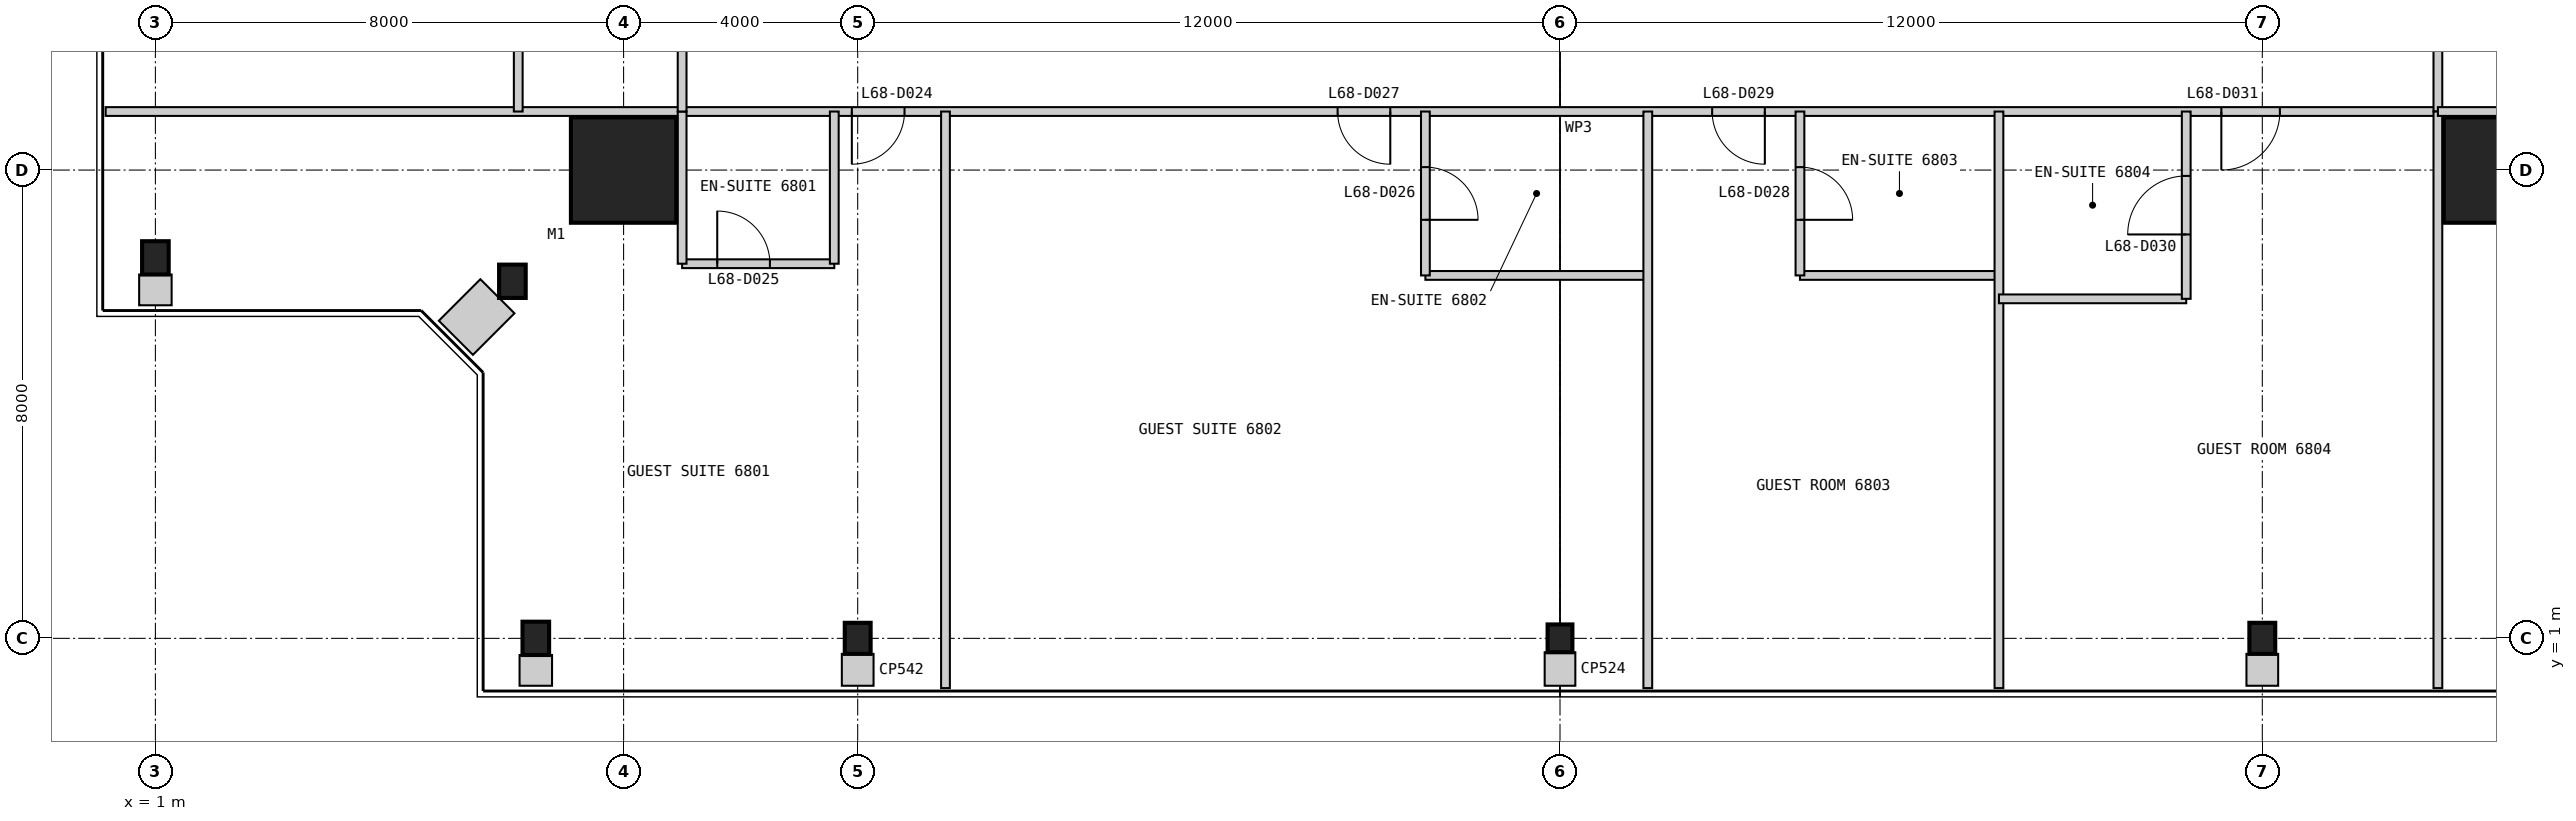
"""IFC4 building model, lengths in metres.
Left out: names, types, materials, properties, quantities, classifications, styles, units other than length and angle.
Written with IfcOpenShell. Run it as: python <this file> out.ifc"""

import sys

from ifc_helpers import new_model, si_unit, direction, frame, frame_2d, origin, origin_2d, place, context, subcontext, project, spatial, rectangle, i_section, extrude, element, fill, save


model = new_model("IFC4")
c1 = context("Model", 3, precision=1e-05, world=origin(), true_north=direction((0.0, 1.0)))
c2 = subcontext(c1, "Body", "Model", "MODEL_VIEW")
j1 = project(units=[si_unit("LENGTHUNIT", "METRE"), si_unit("PLANEANGLEUNIT", "RADIAN")], contexts=[c1])
p1 = place(None, origin())
s1 = spatial("IfcSite", under=j1, at=p1, CompositionType="ELEMENT")
p2 = place(p1, origin())
s2 = spatial("IfcBuilding", under=s1, at=p2, CompositionType="ELEMENT")
p3 = place(p2, frame((0.0, 0.0, 283.2)))
s3 = spatial("IfcBuildingStorey", under=s2, at=p3, CompositionType="ELEMENT", Elevation=283.2)
for number, where, z_axis, x_axis in (
    (1, (9.0, 9.0, 0.0), (0.0, 0.0, 1.0), (1.0, 0.0, 0.0)),
    (2, (41.0, 9.0, 0.0), (0.0, 0.0, 1.0), (1.0, 0.0, 0.0)),
):
    element("IfcColumn", number, at=place(p3, frame(where, z_axis=z_axis, x_axis=x_axis)), inside=s3, PredefinedType="COLUMN", context=c2, shape_type="SweptSolid", body=[
        extrude(rectangle(XDim=1.8, YDim=1.8, at=origin_2d()), origin(), (0.0, 0.0, 1.0), 3.4),
    ])
p4 = place(p3, frame((7.5, 1.0, 0.0), z_axis=(0.0, 0.0, 1.0), x_axis=(1.0, 0.0, 0.0)))
e3 = element("IfcColumn", 3, at=p4, inside=s3, PredefinedType="COLUMN", context=c2, shape_type="SweptSolid", body=[
    extrude(i_section(OverallWidth=0.455, OverallDepth=0.569, WebThickness=0.078, FlangeThickness=0.125, at=origin_2d()), origin(), (0.0, 0.0, 1.0), 3.4),
])
p5 = place(p3, frame((13.0, 1.0, 0.0), z_axis=(0.0, 0.0, 1.0), x_axis=(1.0, 0.0, 0.0)))
e4 = element("IfcColumn", 4, at=p5, inside=s3, PredefinedType="COLUMN", context=c2, shape_type="SweptSolid", body=[
    extrude(i_section(OverallWidth=0.442, OverallDepth=0.531, WebThickness=0.066, FlangeThickness=0.106, at=origin_2d()), origin(), (0.0, 0.0, 1.0), 3.4),
])
p6 = place(p3, frame((25.0, 1.0, 0.0), z_axis=(0.0, 0.0, 1.0), x_axis=(1.0, 0.0, 0.0)))
e5 = element("IfcColumn", 5, at=p6, inside=s3, PredefinedType="COLUMN", context=c2, shape_type="SweptSolid", body=[
    extrude(i_section(OverallWidth=0.424, OverallDepth=0.475, WebThickness=0.048, FlangeThickness=0.077, at=origin_2d()), origin(), (0.0, 0.0, 1.0), 3.4),
])
p7 = place(p3, frame((37.0, 1.0, 0.0), z_axis=(0.0, 0.0, 1.0), x_axis=(1.0, 0.0, 0.0)))
e6 = element("IfcColumn", 6, at=p7, inside=s3, PredefinedType="COLUMN", context=c2, shape_type="SweptSolid", body=[
    extrude(i_section(OverallWidth=0.442, OverallDepth=0.531, WebThickness=0.066, FlangeThickness=0.106, at=origin_2d()), origin(), (0.0, 0.0, 1.0), 3.4),
])
for number, where, z_axis, x_axis in (
    (7, (1.0, 7.5, 0.0), (0.0, 0.0, 1.0), (1.0, 0.0, 0.0)),
    (8, (7.1, 7.1, 0.0), (0.0, 0.0, 1.0), (1.0, 0.0, 0.0)),
):
    element("IfcColumn", number, at=place(p3, frame(where, z_axis=z_axis, x_axis=x_axis)), inside=s3, PredefinedType="COLUMN", context=c2, shape_type="SweptSolid", body=[
        extrude(i_section(OverallWidth=0.455, OverallDepth=0.569, WebThickness=0.078, FlangeThickness=0.125, at=origin_2d()), origin(), (0.0, 0.0, 1.0), 3.4),
    ])
p8 = place(p3, frame((10.0, 10.0, 0.0), z_axis=(0.0, 0.0, 1.0), x_axis=(1.0, 0.0, 0.0)))
e9 = element("IfcWall", 9, at=p8, inside=s3, PredefinedType="PARTITIONING", context=c2, shape_type="SweptSolid", body=[
    extrude(rectangle(XDim=30.0, YDim=0.15, at=frame_2d((15.0, 0.0))), origin(), (0.0, 0.0, 1.0), 3.25),
])
p9 = place(p8, frame((2.9, 0.0, 0.0)))
e10 = element("IfcOpeningElement", 10, at=p9, cuts=e9, PredefinedType="OPENING", context=c2, shape_type="SweptSolid", body=[
    extrude(rectangle(XDim=0.9, YDim=2.1, at=frame_2d((0.45, 1.05))), frame((0.0, 0.085, 0.0), z_axis=(0.0, -1.0, 0.0), x_axis=(1.0, 0.0, 0.0)), (0.0, 0.0, 1.0), 0.17),
])
p10 = place(p8, frame((11.2, 0.0, 0.0)))
e11 = element("IfcOpeningElement", 11, at=p10, cuts=e9, PredefinedType="OPENING", context=c2, shape_type="SweptSolid", body=[
    extrude(rectangle(XDim=0.9, YDim=2.1, at=frame_2d((0.45, 1.05))), frame((0.0, 0.085, 0.0), z_axis=(0.0, -1.0, 0.0), x_axis=(1.0, 0.0, 0.0)), (0.0, 0.0, 1.0), 0.17),
])
p11 = place(p8, frame((17.6, 0.0, 0.0)))
e12 = element("IfcOpeningElement", 12, at=p11, cuts=e9, PredefinedType="OPENING", context=c2, shape_type="SweptSolid", body=[
    extrude(rectangle(XDim=0.9, YDim=2.1, at=frame_2d((0.45, 1.05))), frame((0.0, 0.085, 0.0), z_axis=(0.0, -1.0, 0.0), x_axis=(1.0, 0.0, 0.0)), (0.0, 0.0, 1.0), 0.17),
])
p12 = place(p8, frame((26.3, 0.0, 0.0)))
e13 = element("IfcOpeningElement", 13, at=p12, cuts=e9, PredefinedType="OPENING", context=c2, shape_type="SweptSolid", body=[
    extrude(rectangle(XDim=1.0, YDim=2.1, at=frame_2d((0.5, 1.05))), frame((0.0, 0.085, 0.0), z_axis=(0.0, -1.0, 0.0), x_axis=(1.0, 0.0, 0.0)), (0.0, 0.0, 1.0), 0.17),
])
p13 = place(p3, frame((0.15, 10.0, 0.0), z_axis=(0.0, 0.0, 1.0), x_axis=(1.0, 0.0, 0.0)))
e14 = element("IfcWall", 14, at=p13, inside=s3, PredefinedType="PARTITIONING", context=c2, shape_type="SweptSolid", body=[
    extrude(rectangle(XDim=9.85, YDim=0.15, at=frame_2d((4.925, 0.0))), origin(), (0.0, 0.0, 1.0), 3.25),
])
p14 = place(p3, frame((10.0, 7.4, 0.0), z_axis=(0.0, 0.0, 1.0), x_axis=(1.0, 0.0, 0.0)))
e15 = element("IfcWall", 15, at=p14, inside=s3, PredefinedType="PARTITIONING", context=c2, shape_type="SweptSolid", body=[
    extrude(rectangle(XDim=2.6, YDim=0.15, at=frame_2d((1.3, 0.0))), origin(), (0.0, 0.0, 1.0), 3.25),
])
p15 = place(p14, frame((0.6, 0.0, 0.0)))
e16 = element("IfcOpeningElement", 16, at=p15, cuts=e15, PredefinedType="OPENING", context=c2, shape_type="SweptSolid", body=[
    extrude(rectangle(XDim=0.9, YDim=2.1, at=frame_2d((0.45, 1.05))), frame((0.0, 0.085, 0.0), z_axis=(0.0, -1.0, 0.0), x_axis=(1.0, 0.0, 0.0)), (0.0, 0.0, 1.0), 0.17),
])
for number, where, z_axis, x_axis in (
    (17, (10.0, 7.4, 0.0), (0.0, 0.0, 1.0), (0.0, 1.0, 0.0)),
    (18, (12.6, 7.4, 0.0), (0.0, 0.0, 1.0), (0.0, 1.0, 0.0)),
):
    element("IfcWall", number, at=place(p3, frame(where, z_axis=z_axis, x_axis=x_axis)), inside=s3, PredefinedType="PARTITIONING", context=c2, shape_type="SweptSolid", body=[
        extrude(rectangle(XDim=2.6, YDim=0.15, at=frame_2d((1.3, 0.0))), origin(), (0.0, 0.0, 1.0), 3.25),
    ])
p16 = place(p3, frame((14.5, 0.15, 0.0), z_axis=(0.0, 0.0, 1.0), x_axis=(0.0, 1.0, 0.0)))
e19 = element("IfcWall", 19, at=p16, inside=s3, PredefinedType="PARTITIONING", context=c2, shape_type="SweptSolid", body=[
    extrude(rectangle(XDim=9.85, YDim=0.15, at=frame_2d((4.925, 0.0))), origin(), (0.0, 0.0, 1.0), 3.25),
])
p17 = place(p3, frame((22.7, 7.2, 0.0), z_axis=(0.0, 0.0, 1.0), x_axis=(1.0, 0.0, 0.0)))
e20 = element("IfcWall", 20, at=p17, inside=s3, PredefinedType="PARTITIONING", context=c2, shape_type="SweptSolid", body=[
    extrude(rectangle(XDim=3.8, YDim=0.15, at=frame_2d((1.9, 0.0))), origin(), (0.0, 0.0, 1.0), 3.25),
])
p18 = place(p3, frame((22.7, 7.2, 0.0), z_axis=(0.0, 0.0, 1.0), x_axis=(0.0, 1.0, 0.0)))
e21 = element("IfcWall", 21, at=p18, inside=s3, PredefinedType="PARTITIONING", context=c2, shape_type="SweptSolid", body=[
    extrude(rectangle(XDim=2.8, YDim=0.15, at=frame_2d((1.4, 0.0))), origin(), (0.0, 0.0, 1.0), 3.25),
])
p19 = place(p18, frame((0.95, 0.0, 0.0)))
e22 = element("IfcOpeningElement", 22, at=p19, cuts=e21, PredefinedType="OPENING", context=c2, shape_type="SweptSolid", body=[
    extrude(rectangle(XDim=0.9, YDim=2.1, at=frame_2d((0.45, 1.05))), frame((0.0, 0.085, 0.0), z_axis=(0.0, -1.0, 0.0), x_axis=(1.0, 0.0, 0.0)), (0.0, 0.0, 1.0), 0.17),
])
p20 = place(p3, frame((26.5, 0.15, 0.0), z_axis=(0.0, 0.0, 1.0), x_axis=(0.0, 1.0, 0.0)))
e23 = element("IfcWall", 23, at=p20, inside=s3, PredefinedType="PARTITIONING", context=c2, shape_type="SweptSolid", body=[
    extrude(rectangle(XDim=9.85, YDim=0.15, at=frame_2d((4.925, 0.0))), origin(), (0.0, 0.0, 1.0), 3.25),
])
p21 = place(p3, frame((29.1, 7.2, 0.0), z_axis=(0.0, 0.0, 1.0), x_axis=(1.0, 0.0, 0.0)))
e24 = element("IfcWall", 24, at=p21, inside=s3, PredefinedType="PARTITIONING", context=c2, shape_type="SweptSolid", body=[
    extrude(rectangle(XDim=3.4, YDim=0.15, at=frame_2d((1.7, 0.0))), origin(), (0.0, 0.0, 1.0), 3.25),
])
p22 = place(p3, frame((29.1, 7.2, 0.0), z_axis=(0.0, 0.0, 1.0), x_axis=(0.0, 1.0, 0.0)))
e25 = element("IfcWall", 25, at=p22, inside=s3, PredefinedType="PARTITIONING", context=c2, shape_type="SweptSolid", body=[
    extrude(rectangle(XDim=2.8, YDim=0.15, at=frame_2d((1.4, 0.0))), origin(), (0.0, 0.0, 1.0), 3.25),
])
p23 = place(p22, frame((0.95, 0.0, 0.0)))
e26 = element("IfcOpeningElement", 26, at=p23, cuts=e25, PredefinedType="OPENING", context=c2, shape_type="SweptSolid", body=[
    extrude(rectangle(XDim=0.9, YDim=2.1, at=frame_2d((0.45, 1.05))), frame((0.0, 0.085, 0.0), z_axis=(0.0, -1.0, 0.0), x_axis=(1.0, 0.0, 0.0)), (0.0, 0.0, 1.0), 0.17),
])
p24 = place(p3, frame((32.5, 0.15, 0.0), z_axis=(0.0, 0.0, 1.0), x_axis=(0.0, 1.0, 0.0)))
e27 = element("IfcWall", 27, at=p24, inside=s3, PredefinedType="PARTITIONING", context=c2, shape_type="SweptSolid", body=[
    extrude(rectangle(XDim=9.85, YDim=0.15, at=frame_2d((4.925, 0.0))), origin(), (0.0, 0.0, 1.0), 3.25),
])
p25 = place(p3, frame((32.5, 6.8, 0.0), z_axis=(0.0, 0.0, 1.0), x_axis=(1.0, 0.0, 0.0)))
e28 = element("IfcWall", 28, at=p25, inside=s3, PredefinedType="PARTITIONING", context=c2, shape_type="SweptSolid", body=[
    extrude(rectangle(XDim=3.2, YDim=0.15, at=frame_2d((1.6, 0.0))), origin(), (0.0, 0.0, 1.0), 3.25),
])
p26 = place(p3, frame((35.7, 6.8, 0.0), z_axis=(0.0, 0.0, 1.0), x_axis=(0.0, 1.0, 0.0)))
e29 = element("IfcWall", 29, at=p26, inside=s3, PredefinedType="PARTITIONING", context=c2, shape_type="SweptSolid", body=[
    extrude(rectangle(XDim=3.2, YDim=0.15, at=frame_2d((1.6, 0.0))), origin(), (0.0, 0.0, 1.0), 3.25),
])
p27 = place(p26, frame((1.1, 0.0, 0.0)))
e30 = element("IfcOpeningElement", 30, at=p27, cuts=e29, PredefinedType="OPENING", context=c2, shape_type="SweptSolid", body=[
    extrude(rectangle(XDim=1.0, YDim=2.1, at=frame_2d((0.5, 1.05))), frame((0.0, 0.085, 0.0), z_axis=(0.0, -1.0, 0.0), x_axis=(1.0, 0.0, 0.0)), (0.0, 0.0, 1.0), 0.17),
])
p28 = place(p3, frame((40.0, 10.0, 0.0), z_axis=(0.0, 0.0, 1.0), x_axis=(0.0, 1.0, 0.0)))
e31 = element("IfcWall", 31, at=p28, inside=s3, PredefinedType="PARTITIONING", context=c2, shape_type="SweptSolid", body=[
    extrude(rectangle(XDim=30.0, YDim=0.15, at=frame_2d((15.0, 0.0))), origin(), (0.0, 0.0, 1.0), 2.638),
])
p29 = place(p28, frame((2.9, 0.0, 0.0)))
e32 = element("IfcOpeningElement", 32, at=p29, cuts=e31, PredefinedType="OPENING", context=c2, shape_type="SweptSolid", body=[
    extrude(rectangle(XDim=0.9, YDim=2.1, at=frame_2d((0.45, 1.05))), frame((0.0, 0.085, 0.0), z_axis=(0.0, -1.0, 0.0), x_axis=(1.0, 0.0, 0.0)), (0.0, 0.0, 1.0), 0.17),
])
p30 = place(p28, frame((11.2, 0.0, 0.0)))
e33 = element("IfcOpeningElement", 33, at=p30, cuts=e31, PredefinedType="OPENING", context=c2, shape_type="SweptSolid", body=[
    extrude(rectangle(XDim=0.9, YDim=2.1, at=frame_2d((0.45, 1.05))), frame((0.0, 0.085, 0.0), z_axis=(0.0, -1.0, 0.0), x_axis=(1.0, 0.0, 0.0)), (0.0, 0.0, 1.0), 0.17),
])
p31 = place(p28, frame((24.7, 0.0, 0.0)))
e34 = element("IfcOpeningElement", 34, at=p31, cuts=e31, PredefinedType="OPENING", context=c2, shape_type="SweptSolid", body=[
    extrude(rectangle(XDim=0.9, YDim=2.1, at=frame_2d((0.45, 1.05))), frame((0.0, 0.085, 0.0), z_axis=(0.0, -1.0, 0.0), x_axis=(1.0, 0.0, 0.0)), (0.0, 0.0, 1.0), 0.17),
])
p32 = place(p3, frame((40.0, 0.15, 0.0), z_axis=(0.0, 0.0, 1.0), x_axis=(0.0, 1.0, 0.0)))
e35 = element("IfcWall", 35, at=p32, inside=s3, PredefinedType="PARTITIONING", context=c2, shape_type="SweptSolid", body=[
    extrude(rectangle(XDim=9.85, YDim=0.15, at=frame_2d((4.925, 0.0))), origin(), (0.0, 0.0, 1.0), 3.25),
])
p33 = place(p3, frame((42.6, 10.0, 0.0), z_axis=(0.0, 0.0, 1.0), x_axis=(-1.0, 0.0, 0.0)))
e36 = element("IfcWall", 36, at=p33, inside=s3, PredefinedType="PARTITIONING", context=c2, shape_type="SweptSolid", body=[
    extrude(rectangle(XDim=2.6, YDim=0.15, at=frame_2d((1.3, 0.0))), origin(), (0.0, 0.0, 1.0), 3.25),
])
p34 = place(p3, frame((10.0, 40.0, 0.0), z_axis=(0.0, 0.0, 1.0), x_axis=(0.0, -1.0, 0.0)))
e37 = element("IfcWall", 37, at=p34, inside=s3, PredefinedType="PARTITIONING", context=c2, shape_type="SweptSolid", body=[
    extrude(rectangle(XDim=30.0, YDim=0.15, at=frame_2d((15.0, 0.0))), origin(), (0.0, 0.0, 1.0), 2.638),
])
p35 = place(p34, frame((2.9, 0.0, 0.0)))
e38 = element("IfcOpeningElement", 38, at=p35, cuts=e37, PredefinedType="OPENING", context=c2, shape_type="SweptSolid", body=[
    extrude(rectangle(XDim=0.9, YDim=2.1, at=frame_2d((0.45, 1.05))), frame((0.0, 0.085, 0.0), z_axis=(0.0, -1.0, 0.0), x_axis=(1.0, 0.0, 0.0)), (0.0, 0.0, 1.0), 0.17),
])
p36 = place(p34, frame((11.2, 0.0, 0.0)))
e39 = element("IfcOpeningElement", 39, at=p36, cuts=e37, PredefinedType="OPENING", context=c2, shape_type="SweptSolid", body=[
    extrude(rectangle(XDim=0.9, YDim=2.1, at=frame_2d((0.45, 1.05))), frame((0.0, 0.085, 0.0), z_axis=(0.0, -1.0, 0.0), x_axis=(1.0, 0.0, 0.0)), (0.0, 0.0, 1.0), 0.17),
])
p37 = place(p34, frame((24.7, 0.0, 0.0)))
e40 = element("IfcOpeningElement", 40, at=p37, cuts=e37, PredefinedType="OPENING", context=c2, shape_type="SweptSolid", body=[
    extrude(rectangle(XDim=0.9, YDim=2.1, at=frame_2d((0.45, 1.05))), frame((0.0, 0.085, 0.0), z_axis=(0.0, -1.0, 0.0), x_axis=(1.0, 0.0, 0.0)), (0.0, 0.0, 1.0), 0.17),
])
p38 = place(p3, frame((7.2, 13.8, 0.0), z_axis=(0.0, 0.0, 1.0), x_axis=(0.0, -1.0, 0.0)))
e41 = element("IfcWall", 41, at=p38, inside=s3, PredefinedType="PARTITIONING", context=c2, shape_type="SweptSolid", body=[
    extrude(rectangle(XDim=3.8, YDim=0.15, at=frame_2d((1.9, 0.0))), origin(), (0.0, 0.0, 1.0), 3.25),
])
p39 = place(p3, frame((7.5, 0.19, 0.0), z_axis=(0.0, 0.0, 1.0), x_axis=(0.0, 1.0, 0.0)))
e42 = element("IfcWall", 42, at=p39, inside=s3, PredefinedType="PARTITIONING", context=c2, shape_type="SweptSolid", body=[
    extrude(rectangle(XDim=0.526, YDim=0.555, at=frame_2d((0.263, 0.0))), origin(), (0.0, 0.0, 1.0), 3.25),
])
p40 = place(p3, frame((13.0, 0.19, 0.0), z_axis=(0.0, 0.0, 1.0), x_axis=(0.0, 1.0, 0.0)))
e43 = element("IfcWall", 43, at=p40, inside=s3, PredefinedType="PARTITIONING", context=c2, shape_type="SweptSolid", body=[
    extrude(rectangle(XDim=0.545, YDim=0.542, at=frame_2d((0.272, 0.0))), origin(), (0.0, 0.0, 1.0), 3.25),
])
p41 = place(p3, frame((1.0, 6.69, 0.0), z_axis=(0.0, 0.0, 1.0), x_axis=(0.0, 1.0, 0.0)))
e44 = element("IfcWall", 44, at=p41, inside=s3, PredefinedType="PARTITIONING", context=c2, shape_type="SweptSolid", body=[
    extrude(rectangle(XDim=0.526, YDim=0.555, at=frame_2d((0.263, 0.0))), origin(), (0.0, 0.0, 1.0), 3.25),
])
p42 = place(p3, frame((6.134, 6.134, 0.0), z_axis=(0.0, 0.0, 1.0), x_axis=(0.707106781187, 0.707106781187, 0.0)))
e45 = element("IfcWall", 45, at=p42, inside=s3, PredefinedType="PARTITIONING", context=c2, shape_type="SweptSolid", body=[
    extrude(rectangle(XDim=1.004, YDim=0.824, at=frame_2d((0.502, 0.0))), origin(), (0.0, 0.0, 1.0), 3.25),
])
p43 = place(p3, frame((25.0, 0.19, 0.0), z_axis=(0.0, 0.0, 1.0), x_axis=(0.0, 1.0, 0.0)))
e46 = element("IfcWall", 46, at=p43, inside=s3, PredefinedType="PARTITIONING", context=c2, shape_type="SweptSolid", body=[
    extrude(rectangle(XDim=0.573, YDim=0.524, at=frame_2d((0.286, 0.0))), origin(), (0.0, 0.0, 1.0), 3.25),
])
p44 = place(p3, frame((37.0, 0.19, 0.0), z_axis=(0.0, 0.0, 1.0), x_axis=(0.0, 1.0, 0.0)))
e47 = element("IfcWall", 47, at=p44, inside=s3, PredefinedType="PARTITIONING", context=c2, shape_type="SweptSolid", body=[
    extrude(rectangle(XDim=0.545, YDim=0.542, at=frame_2d((0.272, 0.0))), origin(), (0.0, 0.0, 1.0), 3.25),
])
p45 = place(p9, frame((0.9, 0.0, 0.0), z_axis=(0.0, 0.0, 1.0), x_axis=(-1.0, 0.0, 0.0)))
e48 = element("IfcDoor", 48, at=p45, inside=s3, OperationType="SINGLE_SWING_RIGHT", PredefinedType="DOOR", context=c2, shape_type="SweptSolid", body=[
    extrude(rectangle(XDim=0.9, YDim=2.1, at=frame_2d((0.45, 1.05))), frame((0.0, 0.025, 0.0), z_axis=(0.0, -1.0, 0.0), x_axis=(1.0, 0.0, 0.0)), (0.0, 0.0, 1.0), 0.05),
])
fill(e10, e48)
p46 = place(p15, origin())
e49 = element("IfcDoor", 49, at=p46, inside=s3, OperationType="SINGLE_SWING_LEFT", PredefinedType="DOOR", context=c2, shape_type="SweptSolid", body=[
    extrude(rectangle(XDim=0.9, YDim=2.1, at=frame_2d((0.45, 1.05))), frame((0.0, 0.025, 0.0), z_axis=(0.0, -1.0, 0.0), x_axis=(1.0, 0.0, 0.0)), (0.0, 0.0, 1.0), 0.05),
])
fill(e16, e49)
p47 = place(p19, frame((0.9, 0.0, 0.0), z_axis=(0.0, 0.0, 1.0), x_axis=(-1.0, 0.0, 0.0)))
e50 = element("IfcDoor", 50, at=p47, inside=s3, OperationType="SINGLE_SWING_RIGHT", PredefinedType="DOOR", context=c2, shape_type="SweptSolid", body=[
    extrude(rectangle(XDim=0.9, YDim=2.1, at=frame_2d((0.45, 1.05))), frame((0.0, 0.025, 0.0), z_axis=(0.0, -1.0, 0.0), x_axis=(1.0, 0.0, 0.0)), (0.0, 0.0, 1.0), 0.05),
])
fill(e22, e50)
p48 = place(p10, frame((0.9, 0.0, 0.0), z_axis=(0.0, 0.0, 1.0), x_axis=(-1.0, 0.0, 0.0)))
e51 = element("IfcDoor", 51, at=p48, inside=s3, OperationType="SINGLE_SWING_LEFT", PredefinedType="DOOR", context=c2, shape_type="SweptSolid", body=[
    extrude(rectangle(XDim=0.9, YDim=2.1, at=frame_2d((0.45, 1.05))), frame((0.0, 0.025, 0.0), z_axis=(0.0, -1.0, 0.0), x_axis=(1.0, 0.0, 0.0)), (0.0, 0.0, 1.0), 0.05),
])
fill(e11, e51)
p49 = place(p23, frame((0.9, 0.0, 0.0), z_axis=(0.0, 0.0, 1.0), x_axis=(-1.0, 0.0, 0.0)))
e52 = element("IfcDoor", 52, at=p49, inside=s3, OperationType="SINGLE_SWING_RIGHT", PredefinedType="DOOR", context=c2, shape_type="SweptSolid", body=[
    extrude(rectangle(XDim=0.9, YDim=2.1, at=frame_2d((0.45, 1.05))), frame((0.0, 0.025, 0.0), z_axis=(0.0, -1.0, 0.0), x_axis=(1.0, 0.0, 0.0)), (0.0, 0.0, 1.0), 0.05),
])
fill(e26, e52)
p50 = place(p11, frame((0.9, 0.0, 0.0), z_axis=(0.0, 0.0, 1.0), x_axis=(-1.0, 0.0, 0.0)))
e53 = element("IfcDoor", 53, at=p50, inside=s3, OperationType="SINGLE_SWING_LEFT", PredefinedType="DOOR", context=c2, shape_type="SweptSolid", body=[
    extrude(rectangle(XDim=0.9, YDim=2.1, at=frame_2d((0.45, 1.05))), frame((0.0, 0.025, 0.0), z_axis=(0.0, -1.0, 0.0), x_axis=(1.0, 0.0, 0.0)), (0.0, 0.0, 1.0), 0.05),
])
fill(e12, e53)
p51 = place(p27, origin())
e54 = element("IfcDoor", 54, at=p51, inside=s3, OperationType="SINGLE_SWING_LEFT", PredefinedType="DOOR", context=c2, shape_type="SweptSolid", body=[
    extrude(rectangle(XDim=1.0, YDim=2.1, at=frame_2d((0.5, 1.05))), frame((0.0, 0.025, 0.0), z_axis=(0.0, -1.0, 0.0), x_axis=(1.0, 0.0, 0.0)), (0.0, 0.0, 1.0), 0.05),
])
fill(e30, e54)
p52 = place(p12, frame((1.0, 0.0, 0.0), z_axis=(0.0, 0.0, 1.0), x_axis=(-1.0, 0.0, 0.0)))
e55 = element("IfcDoor", 55, at=p52, inside=s3, OperationType="SINGLE_SWING_RIGHT", PredefinedType="DOOR", context=c2, shape_type="SweptSolid", body=[
    extrude(rectangle(XDim=1.0, YDim=2.1, at=frame_2d((0.5, 1.05))), frame((0.0, 0.025, 0.0), z_axis=(0.0, -1.0, 0.0), x_axis=(1.0, 0.0, 0.0)), (0.0, 0.0, 1.0), 0.05),
])
fill(e13, e55)
save(model, sys.argv[1])
